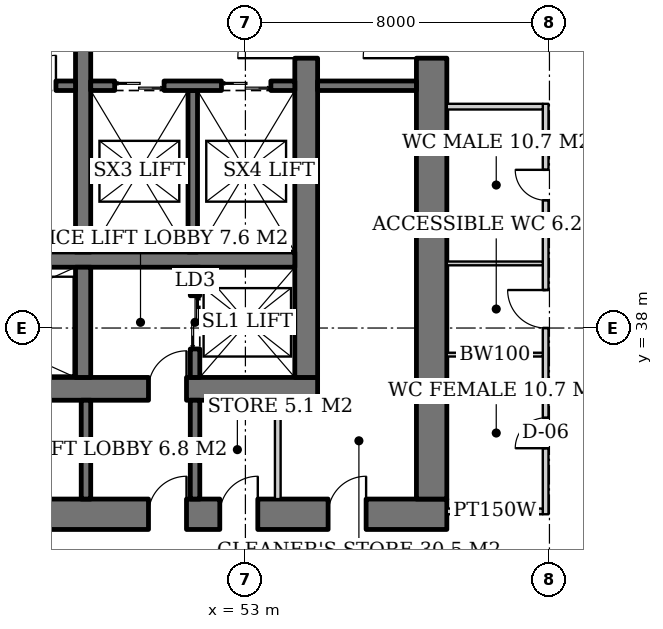
"""IFC4 building model, lengths in metres.
Left out: names, types, materials, properties, quantities, classifications, styles, units other than length and angle.
Written with IfcOpenShell. Run it as: python <this file> out.ifc"""

import sys

from ifc_helpers import new_model, si_unit, direction, frame, frame_2d, origin, place, context, subcontext, project, spatial, rectangle, extrude, element, fill, save


model = new_model("IFC4")
c1 = context("Model", 3, precision=1e-05, world=origin(), true_north=direction((0.0, 1.0)))
c2 = subcontext(c1, "Body", "Model", "MODEL_VIEW")
j1 = project(units=[si_unit("LENGTHUNIT", "METRE"), si_unit("PLANEANGLEUNIT", "RADIAN")], contexts=[c1])
p1 = place(None, origin())
s1 = spatial("IfcSite", under=j1, at=p1, CompositionType="ELEMENT")
p2 = place(p1, origin())
s2 = spatial("IfcBuilding", under=s1, at=p2, CompositionType="ELEMENT")
p3 = place(p2, origin())
s3 = spatial("IfcBuildingStorey", under=s2, at=p3, CompositionType="ELEMENT", Elevation=0.0)
p4 = place(p3, frame((35.1, 36.4, 0.0), z_axis=(0.0, 0.0, 1.0), x_axis=(1.0, 0.0, 0.0)))
e1 = element("IfcWall", 1, at=p4, inside=s3, PredefinedType="SHEAR", context=c2, shape_type="SweptSolid", body=[
    extrude(rectangle(XDim=19.8, YDim=0.6, at=frame_2d((9.9, 0.0))), origin(), (0.0, 0.0, 1.0), 6.0),
])
p5 = place(p4, frame((3.9, 0.0, 0.0)))
e2 = element("IfcOpeningElement", 2, at=p5, cuts=e1, PredefinedType="OPENING", context=c2, shape_type="SweptSolid", body=[
    extrude(rectangle(XDim=1.0, YDim=2.1, at=frame_2d((0.5, 1.05))), frame((0.0, 0.31, 0.0), z_axis=(0.0, -1.0, 0.0), x_axis=(1.0, 0.0, 0.0)), (0.0, 0.0, 1.0), 0.62),
])
p6 = place(p4, frame((15.35, 0.0, 0.0)))
e3 = element("IfcOpeningElement", 3, at=p6, cuts=e1, PredefinedType="OPENING", context=c2, shape_type="SweptSolid", body=[
    extrude(rectangle(XDim=1.0, YDim=2.1, at=frame_2d((0.5, 1.05))), frame((0.0, 0.31, 0.0), z_axis=(0.0, -1.0, 0.0), x_axis=(1.0, 0.0, 0.0)), (0.0, 0.0, 1.0), 0.62),
])
p7 = place(p3, frame((54.6, 36.7, 0.0), z_axis=(0.0, 0.0, 1.0), x_axis=(0.0, 1.0, 0.0)))
e4 = element("IfcWall", 4, at=p7, inside=s3, PredefinedType="SHEAR", context=c2, shape_type="SweptSolid", body=[
    extrude(rectangle(XDim=18.6, YDim=0.6, at=frame_2d((9.3, 0.0))), origin(), (0.0, 0.0, 1.0), 6.0),
])
p8 = place(p7, frame((8.4, 0.0, 0.0)))
e5 = element("IfcOpeningElement", 5, at=p8, cuts=e4, PredefinedType="OPENING", context=c2, shape_type="SweptSolid", body=[
    extrude(rectangle(XDim=1.8, YDim=2.4, at=frame_2d((0.9, 1.2))), frame((0.0, 0.31, 0.0), z_axis=(0.0, -1.0, 0.0), x_axis=(1.0, 0.0, 0.0)), (0.0, 0.0, 1.0), 0.62),
])
p9 = place(p3, frame((31.7, 33.1, 0.0), z_axis=(0.0, 0.0, 1.0), x_axis=(1.0, 0.0, 0.0)))
e6 = element("IfcWall", 6, at=p9, inside=s3, PredefinedType="SHEAR", context=c2, shape_type="SweptSolid", body=[
    extrude(rectangle(XDim=26.6, YDim=0.8, at=frame_2d((13.3, 0.0))), origin(), (0.0, 0.0, 1.0), 6.0),
])
p10 = place(p9, frame((7.3, 0.0, 0.0)))
e7 = element("IfcOpeningElement", 7, at=p10, cuts=e6, PredefinedType="OPENING", context=c2, shape_type="SweptSolid", body=[
    extrude(rectangle(XDim=1.0, YDim=2.1, at=frame_2d((0.5, 1.05))), frame((0.0, 0.41, 0.0), z_axis=(0.0, -1.0, 0.0), x_axis=(1.0, 0.0, 0.0)), (0.0, 0.0, 1.0), 0.82),
])
p11 = place(p9, frame((18.75, 0.0, 0.0)))
e8 = element("IfcOpeningElement", 8, at=p11, cuts=e6, PredefinedType="OPENING", context=c2, shape_type="SweptSolid", body=[
    extrude(rectangle(XDim=1.0, YDim=2.1, at=frame_2d((0.5, 1.05))), frame((0.0, 0.41, 0.0), z_axis=(0.0, -1.0, 0.0), x_axis=(1.0, 0.0, 0.0)), (0.0, 0.0, 1.0), 0.82),
])
p12 = place(p9, frame((1.9, 0.0, 0.0)))
e9 = element("IfcOpeningElement", 9, at=p12, cuts=e6, PredefinedType="OPENING", context=c2, shape_type="SweptSolid", body=[
    extrude(rectangle(XDim=1.0, YDim=2.1, at=frame_2d((0.5, 1.05))), frame((0.0, 0.41, 0.0), z_axis=(0.0, -1.0, 0.0), x_axis=(1.0, 0.0, 0.0)), (0.0, 0.0, 1.0), 0.82),
])
p13 = place(p9, frame((4.725, 0.0, 0.0)))
e10 = element("IfcOpeningElement", 10, at=p13, cuts=e6, PredefinedType="OPENING", context=c2, shape_type="SweptSolid", body=[
    extrude(rectangle(XDim=1.0, YDim=2.1, at=frame_2d((0.5, 1.05))), frame((0.0, 0.41, 0.0), z_axis=(0.0, -1.0, 0.0), x_axis=(1.0, 0.0, 0.0)), (0.0, 0.0, 1.0), 0.82),
])
p14 = place(p9, frame((12.44, 0.0, 0.0)))
e11 = element("IfcOpeningElement", 11, at=p14, cuts=e6, PredefinedType="OPENING", context=c2, shape_type="SweptSolid", body=[
    extrude(rectangle(XDim=1.0, YDim=2.1, at=frame_2d((0.5, 1.05))), frame((0.0, 0.41, 0.0), z_axis=(0.0, -1.0, 0.0), x_axis=(1.0, 0.0, 0.0)), (0.0, 0.0, 1.0), 0.82),
])
p15 = place(p9, frame((20.626, 0.0, 0.0)))
e12 = element("IfcOpeningElement", 12, at=p15, cuts=e6, PredefinedType="OPENING", context=c2, shape_type="SweptSolid", body=[
    extrude(rectangle(XDim=1.0, YDim=2.1, at=frame_2d((0.5, 1.05))), frame((0.0, 0.41, 0.0), z_axis=(0.0, -1.0, 0.0), x_axis=(1.0, 0.0, 0.0)), (0.0, 0.0, 1.0), 0.82),
])
p16 = place(p9, frame((23.476, 0.0, 0.0)))
e13 = element("IfcOpeningElement", 13, at=p16, cuts=e6, PredefinedType="OPENING", context=c2, shape_type="SweptSolid", body=[
    extrude(rectangle(XDim=1.0, YDim=2.1, at=frame_2d((0.5, 1.05))), frame((0.0, 0.41, 0.0), z_axis=(0.0, -1.0, 0.0), x_axis=(1.0, 0.0, 0.0)), (0.0, 0.0, 1.0), 0.82),
])
p17 = place(p3, frame((57.9, 33.5, 0.0), z_axis=(0.0, 0.0, 1.0), x_axis=(0.0, 1.0, 0.0)))
e14 = element("IfcWall", 14, at=p17, inside=s3, PredefinedType="SHEAR", context=c2, shape_type="SweptSolid", body=[
    extrude(rectangle(XDim=25.0, YDim=0.8, at=frame_2d((12.5, 0.0))), origin(), (0.0, 0.0, 1.0), 6.0),
])
p18 = place(p17, frame((11.6, 0.0, 0.0)))
e15 = element("IfcOpeningElement", 15, at=p18, cuts=e14, PredefinedType="OPENING", context=c2, shape_type="SweptSolid", body=[
    extrude(rectangle(XDim=1.8, YDim=2.4, at=frame_2d((0.9, 1.2))), frame((0.0, 0.41, 0.0), z_axis=(0.0, -1.0, 0.0), x_axis=(1.0, 0.0, 0.0)), (0.0, 0.0, 1.0), 0.82),
])
p19 = place(p3, frame((35.7, 39.8, 0.0), z_axis=(0.0, 0.0, 1.0), x_axis=(1.0, 0.0, 0.0)))
e16 = element("IfcWall", 16, at=p19, inside=s3, PredefinedType="SHEAR", context=c2, shape_type="SweptSolid", body=[
    extrude(rectangle(XDim=18.6, YDim=0.4, at=frame_2d((9.3, 0.0))), origin(), (0.0, 0.0, 1.0), 6.0),
])
p20 = place(p3, frame((48.73, 36.7, 0.0), z_axis=(0.0, 0.0, 1.0), x_axis=(0.0, 1.0, 0.0)))
e17 = element("IfcWall", 17, at=p20, inside=s3, PredefinedType="SHEAR", context=c2, shape_type="SweptSolid", body=[
    extrude(rectangle(XDim=2.9, YDim=0.4, at=frame_2d((1.45, 0.0))), origin(), (0.0, 0.0, 1.0), 6.0),
])
p21 = place(p3, frame((48.73, 40.0, 0.0), z_axis=(0.0, 0.0, 1.0), x_axis=(0.0, 1.0, 0.0)))
e18 = element("IfcWall", 18, at=p21, inside=s3, PredefinedType="SHEAR", context=c2, shape_type="SweptSolid", body=[
    extrude(rectangle(XDim=12.0, YDim=0.4, at=frame_2d((6.0, 0.0))), origin(), (0.0, 0.0, 1.0), 6.0),
])
p22 = place(p3, frame((51.675, 36.7, 0.0), z_axis=(0.0, 0.0, 1.0), x_axis=(0.0, 1.0, 0.0)))
e19 = element("IfcWall", 19, at=p22, inside=s3, PredefinedType="SHEAR", context=c2, shape_type="SweptSolid", body=[
    extrude(rectangle(XDim=2.9, YDim=0.25, at=frame_2d((1.45, 0.0))), origin(), (0.0, 0.0, 1.0), 6.0),
])
p23 = place(p22, frame((0.75, 0.0, 0.0)))
e20 = element("IfcOpeningElement", 20, at=p23, cuts=e19, PredefinedType="OPENING", context=c2, shape_type="SweptSolid", body=[
    extrude(rectangle(XDim=1.4, YDim=2.4, at=frame_2d((0.7, 1.2))), frame((0.0, 0.135, 0.0), z_axis=(0.0, -1.0, 0.0), x_axis=(1.0, 0.0, 0.0)), (0.0, 0.0, 1.0), 0.27),
])
p24 = place(p3, frame((35.7, 44.375, 0.0), z_axis=(0.0, 0.0, 1.0), x_axis=(1.0, 0.0, 0.0)))
e21 = element("IfcWall", 21, at=p24, inside=s3, PredefinedType="SHEAR", context=c2, shape_type="SweptSolid", body=[
    extrude(rectangle(XDim=12.83, YDim=0.25, at=frame_2d((6.415, 0.0))), origin(), (0.0, 0.0, 1.0), 6.0),
])
p25 = place(p24, frame((0.7, 0.0, 0.0)))
e22 = element("IfcOpeningElement", 22, at=p25, cuts=e21, PredefinedType="OPENING", context=c2, shape_type="SweptSolid", body=[
    extrude(rectangle(XDim=1.1, YDim=2.2, at=frame_2d((0.55, 1.1))), frame((0.0, 0.135, 0.0), z_axis=(0.0, -1.0, 0.0), x_axis=(1.0, 0.0, 0.0)), (0.0, 0.0, 1.0), 0.27),
])
p26 = place(p24, frame((3.45, 0.0, 0.0)))
e23 = element("IfcOpeningElement", 23, at=p26, cuts=e21, PredefinedType="OPENING", context=c2, shape_type="SweptSolid", body=[
    extrude(rectangle(XDim=1.1, YDim=2.2, at=frame_2d((0.55, 1.1))), frame((0.0, 0.135, 0.0), z_axis=(0.0, -1.0, 0.0), x_axis=(1.0, 0.0, 0.0)), (0.0, 0.0, 1.0), 0.27),
])
p27 = place(p24, frame((6.2, 0.0, 0.0)))
e24 = element("IfcOpeningElement", 24, at=p27, cuts=e21, PredefinedType="OPENING", context=c2, shape_type="SweptSolid", body=[
    extrude(rectangle(XDim=1.1, YDim=2.2, at=frame_2d((0.55, 1.1))), frame((0.0, 0.135, 0.0), z_axis=(0.0, -1.0, 0.0), x_axis=(1.0, 0.0, 0.0)), (0.0, 0.0, 1.0), 0.27),
])
p28 = place(p24, frame((8.95, 0.0, 0.0)))
e25 = element("IfcOpeningElement", 25, at=p28, cuts=e21, PredefinedType="OPENING", context=c2, shape_type="SweptSolid", body=[
    extrude(rectangle(XDim=1.1, YDim=2.2, at=frame_2d((0.55, 1.1))), frame((0.0, 0.135, 0.0), z_axis=(0.0, -1.0, 0.0), x_axis=(1.0, 0.0, 0.0)), (0.0, 0.0, 1.0), 0.27),
])
p29 = place(p24, frame((11.515, 0.0, 0.0)))
e26 = element("IfcOpeningElement", 26, at=p29, cuts=e21, PredefinedType="OPENING", context=c2, shape_type="SweptSolid", body=[
    extrude(rectangle(XDim=0.8, YDim=2.0, at=frame_2d((0.4, 1.0))), frame((0.0, 0.135, 0.0), z_axis=(0.0, -1.0, 0.0), x_axis=(1.0, 0.0, 0.0)), (0.0, 0.0, 1.0), 0.27),
])
p30 = place(p3, frame((51.615, 44.25, 0.0), z_axis=(0.0, 0.0, 1.0), x_axis=(0.0, -1.0, 0.0)))
e27 = element("IfcWall", 27, at=p30, inside=s3, PredefinedType="SHEAR", context=c2, shape_type="SweptSolid", body=[
    extrude(rectangle(XDim=4.25, YDim=0.25, at=frame_2d((2.125, 0.0))), origin(), (0.0, 0.0, 1.0), 6.0),
])
p31 = place(p3, frame((48.93, 44.375, 0.0), z_axis=(0.0, 0.0, 1.0), x_axis=(1.0, 0.0, 0.0)))
e28 = element("IfcWall", 28, at=p31, inside=s3, PredefinedType="SHEAR", context=c2, shape_type="SweptSolid", body=[
    extrude(rectangle(XDim=5.37, YDim=0.25, at=frame_2d((2.685, 0.0))), origin(), (0.0, 0.0, 1.0), 6.0),
])
p32 = place(p31, frame((0.63, 0.0, 0.0)))
e29 = element("IfcOpeningElement", 29, at=p32, cuts=e28, PredefinedType="OPENING", context=c2, shape_type="SweptSolid", body=[
    extrude(rectangle(XDim=1.3, YDim=2.2, at=frame_2d((0.65, 1.1))), frame((0.0, 0.135, 0.0), z_axis=(0.0, -1.0, 0.0), x_axis=(1.0, 0.0, 0.0)), (0.0, 0.0, 1.0), 0.27),
])
p33 = place(p31, frame((3.44, 0.0, 0.0)))
e30 = element("IfcOpeningElement", 30, at=p33, cuts=e28, PredefinedType="OPENING", context=c2, shape_type="SweptSolid", body=[
    extrude(rectangle(XDim=1.3, YDim=2.2, at=frame_2d((0.65, 1.1))), frame((0.0, 0.135, 0.0), z_axis=(0.0, -1.0, 0.0), x_axis=(1.0, 0.0, 0.0)), (0.0, 0.0, 1.0), 0.27),
])
for number, where, z_axis, x_axis in (
    (31, (54.9, 44.375, 0.0), (0.0, 0.0, 1.0), (1.0, 0.0, 0.0)),
    (32, (48.805, 33.5, 0.0), (0.0, 0.0, 1.0), (0.0, 1.0, 0.0)),
    (33, (51.675, 33.5, 0.0), (0.0, 0.0, 1.0), (0.0, 1.0, 0.0)),
):
    element("IfcWall", number, at=place(p3, frame(where, z_axis=z_axis, x_axis=x_axis)), inside=s3, PredefinedType="SOLIDWALL", context=c2, shape_type="SweptSolid", body=[
        extrude(rectangle(XDim=2.6, YDim=0.25, at=frame_2d((1.3, 0.0))), origin(), (0.0, 0.0, 1.0), 5.7),
    ])
p34 = place(p3, frame((53.852, 33.5, 0.0), z_axis=(0.0, 0.0, 1.0), x_axis=(0.0, 1.0, 0.0)))
e34 = element("IfcWall", 34, at=p34, inside=s3, PredefinedType="SOLIDWALL", context=c2, shape_type="SweptSolid", body=[
    extrude(rectangle(XDim=2.6, YDim=0.15, at=frame_2d((1.3, 0.0))), origin(), (0.0, 0.0, 1.0), 5.7),
])
p35 = place(p3, frame((60.9, 33.1, 0.0), z_axis=(0.0, 0.0, 1.0), x_axis=(0.0, 1.0, 0.0)))
e35 = element("IfcWall", 35, at=p35, inside=s3, PredefinedType="PARTITIONING", context=c2, shape_type="SweptSolid", body=[
    extrude(rectangle(XDim=10.8, YDim=0.15, at=frame_2d((5.4, 0.0))), origin(), (0.0, 0.0, 1.0), 4.688),
])
p36 = place(p35, frame((1.738, 0.0, 0.0)))
e36 = element("IfcOpeningElement", 36, at=p36, cuts=e35, PredefinedType="OPENING", context=c2, shape_type="SweptSolid", body=[
    extrude(rectangle(XDim=0.8, YDim=2.1, at=frame_2d((0.4, 1.05))), frame((0.0, 0.085, 0.0), z_axis=(0.0, -1.0, 0.0), x_axis=(1.0, 0.0, 0.0)), (0.0, 0.0, 1.0), 0.17),
])
p37 = place(p35, frame((4.9, 0.0, 0.0)))
e37 = element("IfcOpeningElement", 37, at=p37, cuts=e35, PredefinedType="OPENING", context=c2, shape_type="SweptSolid", body=[
    extrude(rectangle(XDim=1.0, YDim=2.1, at=frame_2d((0.5, 1.05))), frame((0.0, 0.085, 0.0), z_axis=(0.0, -1.0, 0.0), x_axis=(1.0, 0.0, 0.0)), (0.0, 0.0, 1.0), 0.17),
])
p38 = place(p35, frame((8.262, 0.0, 0.0)))
e38 = element("IfcOpeningElement", 38, at=p38, cuts=e35, PredefinedType="OPENING", context=c2, shape_type="SweptSolid", body=[
    extrude(rectangle(XDim=0.8, YDim=2.1, at=frame_2d((0.4, 1.05))), frame((0.0, 0.085, 0.0), z_axis=(0.0, -1.0, 0.0), x_axis=(1.0, 0.0, 0.0)), (0.0, 0.0, 1.0), 0.17),
])
p39 = place(p3, frame((60.825, 33.175, 0.0), z_axis=(0.0, 0.0, 1.0), x_axis=(-1.0, 0.0, 0.0)))
e39 = element("IfcWall", 39, at=p39, inside=s3, PredefinedType="PARTITIONING", context=c2, shape_type="SweptSolid", body=[
    extrude(rectangle(XDim=2.525, YDim=0.15, at=frame_2d((1.262, 0.0))), origin(), (0.0, 0.0, 1.0), 4.688),
])
p40 = place(p3, frame((60.825, 37.3, 0.0), z_axis=(0.0, 0.0, 1.0), x_axis=(-1.0, 0.0, 0.0)))
e40 = element("IfcWall", 40, at=p40, inside=s3, PredefinedType="SOLIDWALL", context=c2, shape_type="SweptSolid", body=[
    extrude(rectangle(XDim=2.525, YDim=0.1, at=frame_2d((1.262, 0.0))), origin(), (0.0, 0.0, 1.0), 4.9),
])
p41 = place(p3, frame((60.825, 39.7, 0.0), z_axis=(0.0, 0.0, 1.0), x_axis=(-1.0, 0.0, 0.0)))
e41 = element("IfcWall", 41, at=p41, inside=s3, PredefinedType="SOLIDWALL", context=c2, shape_type="SweptSolid", body=[
    extrude(rectangle(XDim=2.525, YDim=0.1, at=frame_2d((1.262, 0.0))), origin(), (0.0, 0.0, 1.0), 5.7),
])
p42 = place(p3, frame((60.825, 43.825, 0.0), z_axis=(0.0, 0.0, 1.0), x_axis=(-1.0, 0.0, 0.0)))
e42 = element("IfcWall", 42, at=p42, inside=s3, PredefinedType="PARTITIONING", context=c2, shape_type="SweptSolid", body=[
    extrude(rectangle(XDim=2.525, YDim=0.15, at=frame_2d((1.262, 0.0))), origin(), (0.0, 0.0, 1.0), 5.7),
])
p43 = place(p23, origin())
e43 = element("IfcDoor", 43, at=p43, inside=s3, OperationType="DOUBLE_DOOR_SLIDING", PredefinedType="DOOR", context=c2, shape_type="SweptSolid", body=[
    extrude(rectangle(XDim=1.4, YDim=2.4, at=frame_2d((0.7, 1.2))), frame((0.0, 0.025, 0.0), z_axis=(0.0, -1.0, 0.0), x_axis=(1.0, 0.0, 0.0)), (0.0, 0.0, 1.0), 0.05),
])
fill(e20, e43)
p44 = place(p29, origin())
e44 = element("IfcDoor", 44, at=p44, inside=s3, OperationType="SINGLE_SWING_RIGHT", PredefinedType="DOOR", context=c2, shape_type="SweptSolid", body=[
    extrude(rectangle(XDim=0.8, YDim=2.0, at=frame_2d((0.4, 1.0))), frame((0.0, 0.025, 0.0), z_axis=(0.0, -1.0, 0.0), x_axis=(1.0, 0.0, 0.0)), (0.0, 0.0, 1.0), 0.05),
])
fill(e26, e44)
p45 = place(p32, origin())
e45 = element("IfcDoor", 45, at=p45, inside=s3, OperationType="DOUBLE_DOOR_SLIDING", PredefinedType="DOOR", context=c2, shape_type="SweptSolid", body=[
    extrude(rectangle(XDim=1.3, YDim=2.2, at=frame_2d((0.65, 1.1))), frame((0.0, 0.025, 0.0), z_axis=(0.0, -1.0, 0.0), x_axis=(1.0, 0.0, 0.0)), (0.0, 0.0, 1.0), 0.05),
])
fill(e29, e45)
p46 = place(p33, origin())
e46 = element("IfcDoor", 46, at=p46, inside=s3, OperationType="DOUBLE_DOOR_SLIDING", PredefinedType="DOOR", context=c2, shape_type="SweptSolid", body=[
    extrude(rectangle(XDim=1.3, YDim=2.2, at=frame_2d((0.65, 1.1))), frame((0.0, 0.025, 0.0), z_axis=(0.0, -1.0, 0.0), x_axis=(1.0, 0.0, 0.0)), (0.0, 0.0, 1.0), 0.05),
])
fill(e30, e46)
p47 = place(p8, origin())
e47 = element("IfcDoor", 47, at=p47, inside=s3, OperationType="DOUBLE_DOOR_SINGLE_SWING", PredefinedType="DOOR", context=c2, shape_type="SweptSolid", body=[
    extrude(rectangle(XDim=1.8, YDim=2.4, at=frame_2d((0.9, 1.2))), frame((0.0, 0.025, 0.0), z_axis=(0.0, -1.0, 0.0), x_axis=(1.0, 0.0, 0.0)), (0.0, 0.0, 1.0), 0.05),
])
fill(e5, e47)
p48 = place(p6, origin())
e48 = element("IfcDoor", 48, at=p48, inside=s3, OperationType="SINGLE_SWING_RIGHT", PredefinedType="DOOR", context=c2, shape_type="SweptSolid", body=[
    extrude(rectangle(XDim=1.0, YDim=2.1, at=frame_2d((0.5, 1.05))), frame((0.0, 0.025, 0.0), z_axis=(0.0, -1.0, 0.0), x_axis=(1.0, 0.0, 0.0)), (0.0, 0.0, 1.0), 0.05),
])
fill(e3, e48)
p49 = place(p18, origin())
e49 = element("IfcDoor", 49, at=p49, inside=s3, OperationType="DOUBLE_DOOR_SINGLE_SWING", PredefinedType="DOOR", context=c2, shape_type="SweptSolid", body=[
    extrude(rectangle(XDim=1.8, YDim=2.4, at=frame_2d((0.9, 1.2))), frame((0.0, 0.025, 0.0), z_axis=(0.0, -1.0, 0.0), x_axis=(1.0, 0.0, 0.0)), (0.0, 0.0, 1.0), 0.05),
])
fill(e15, e49)
p50 = place(p11, origin())
e50 = element("IfcDoor", 50, at=p50, inside=s3, OperationType="SINGLE_SWING_RIGHT", PredefinedType="DOOR", context=c2, shape_type="SweptSolid", body=[
    extrude(rectangle(XDim=1.0, YDim=2.1, at=frame_2d((0.5, 1.05))), frame((0.0, 0.025, 0.0), z_axis=(0.0, -1.0, 0.0), x_axis=(1.0, 0.0, 0.0)), (0.0, 0.0, 1.0), 0.05),
])
fill(e8, e50)
p51 = place(p15, origin())
e51 = element("IfcDoor", 51, at=p51, inside=s3, OperationType="SINGLE_SWING_RIGHT", PredefinedType="DOOR", context=c2, shape_type="SweptSolid", body=[
    extrude(rectangle(XDim=1.0, YDim=2.1, at=frame_2d((0.5, 1.05))), frame((0.0, 0.39, 0.0), z_axis=(0.0, -1.0, 0.0), x_axis=(1.0, 0.0, 0.0)), (0.0, 0.0, 1.0), 0.05),
])
fill(e12, e51)
p52 = place(p16, origin())
e52 = element("IfcDoor", 52, at=p52, inside=s3, OperationType="SINGLE_SWING_RIGHT", PredefinedType="DOOR", context=c2, shape_type="SweptSolid", body=[
    extrude(rectangle(XDim=1.0, YDim=2.1, at=frame_2d((0.5, 1.05))), frame((0.0, 0.39, 0.0), z_axis=(0.0, -1.0, 0.0), x_axis=(1.0, 0.0, 0.0)), (0.0, 0.0, 1.0), 0.05),
])
fill(e13, e52)
p53 = place(p36, origin())
e53 = element("IfcDoor", 53, at=p53, inside=s3, OperationType="SINGLE_SWING_LEFT", PredefinedType="DOOR", context=c2, shape_type="SweptSolid", body=[
    extrude(rectangle(XDim=0.8, YDim=2.1, at=frame_2d((0.4, 1.05))), frame((0.0, 0.025, 0.0), z_axis=(0.0, -1.0, 0.0), x_axis=(1.0, 0.0, 0.0)), (0.0, 0.0, 1.0), 0.05),
])
fill(e36, e53)
p54 = place(p37, origin())
e54 = element("IfcDoor", 54, at=p54, inside=s3, OperationType="SINGLE_SWING_RIGHT", PredefinedType="DOOR", context=c2, shape_type="SweptSolid", body=[
    extrude(rectangle(XDim=1.0, YDim=2.1, at=frame_2d((0.5, 1.05))), frame((0.0, 0.025, 0.0), z_axis=(0.0, -1.0, 0.0), x_axis=(1.0, 0.0, 0.0)), (0.0, 0.0, 1.0), 0.05),
])
fill(e37, e54)
p55 = place(p38, origin())
e55 = element("IfcDoor", 55, at=p55, inside=s3, OperationType="SINGLE_SWING_RIGHT", PredefinedType="DOOR", context=c2, shape_type="SweptSolid", body=[
    extrude(rectangle(XDim=0.8, YDim=2.1, at=frame_2d((0.4, 1.05))), frame((0.0, 0.025, 0.0), z_axis=(0.0, -1.0, 0.0), x_axis=(1.0, 0.0, 0.0)), (0.0, 0.0, 1.0), 0.05),
])
fill(e38, e55)
save(model, sys.argv[1])
